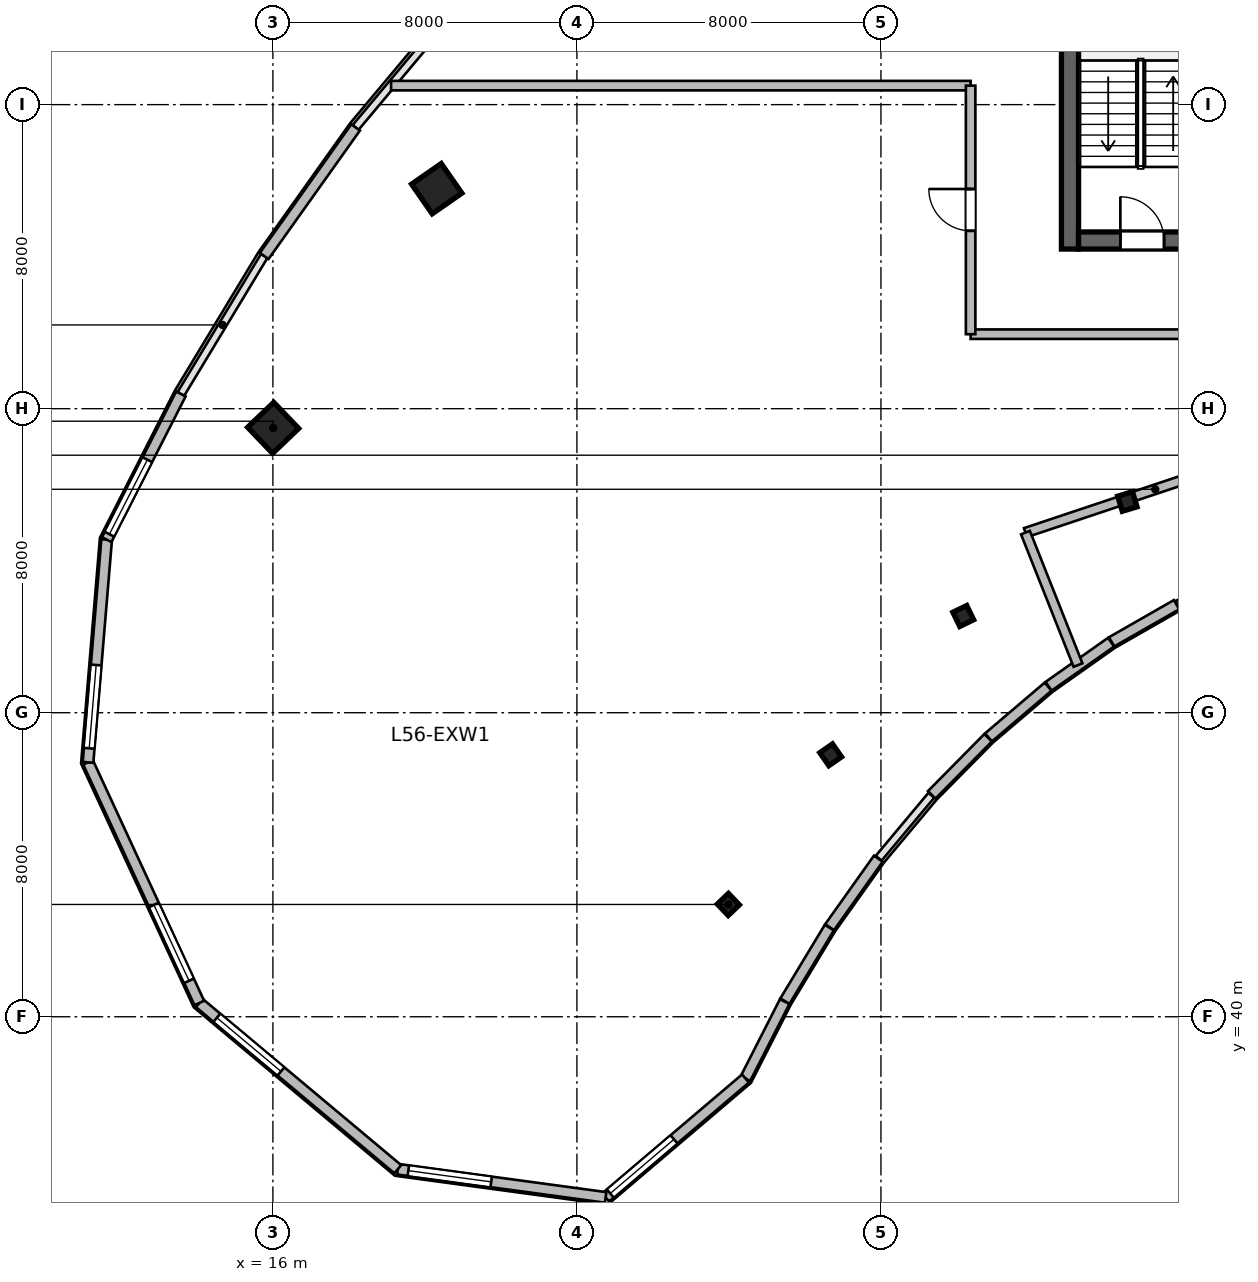
"""IFC4 building model, lengths in metres.
Left out: names, types, materials, properties, quantities, classifications, styles, units other than length and angle.
Written with IfcOpenShell. Run it as: python <this file> out.ifc"""

import sys

from ifc_helpers import new_model, si_unit, direction, frame, frame_2d, origin, origin_2d, place, context, subcontext, project, spatial, rectangle, i_section, extrude, source, transform, mapped, element, fill, save


model = new_model("IFC4")
c1 = context("Model", 3, precision=1e-05, world=origin(), true_north=direction((0.0, 1.0)))
c2 = subcontext(c1, "Body", "Model", "MODEL_VIEW")
j1 = project(units=[si_unit("LENGTHUNIT", "METRE"), si_unit("PLANEANGLEUNIT", "RADIAN")], contexts=[c1])
p1 = place(None, origin())
s1 = spatial("IfcSite", under=j1, at=p1, CompositionType="ELEMENT")
p2 = place(p1, origin())
s2 = spatial("IfcBuilding", under=s1, at=p2, CompositionType="ELEMENT")
p3 = place(p2, frame((0.0, 0.0, 231.3)))
s3 = spatial("IfcBuildingStorey", under=s2, at=p3, CompositionType="ELEMENT", Elevation=231.3)
m1 = source(origin(), c2, "Body", "SweptSolid", [
    extrude(rectangle(XDim=12.0, YDim=0.45, at=frame_2d((6.0, 0.0))), origin(), (0.0, 0.0, 1.0), 3.9),
])
p4 = place(p3, frame((36.975, 60.2, 0.0), z_axis=(0.0, 0.0, 1.0), x_axis=(0.0, 1.0, 0.0)))
e1 = element("IfcWall", 1, at=p4, inside=s3, PredefinedType="SHEAR", context=c2, shape_type="MappedRepresentation", body=[
    mapped(m1, transform((0.0, 0.0, 0.0), scale=1.0)),
])
m2 = source(origin(), c2, "Body", "SweptSolid", [
    extrude(rectangle(XDim=21.6, YDim=0.45, at=frame_2d((10.8, 0.0))), origin(), (0.0, 0.0, 1.0), 3.9),
])
p5 = place(p3, frame((37.2, 60.425, 0.0), z_axis=(0.0, 0.0, 1.0), x_axis=(1.0, 0.0, 0.0)))
e2 = element("IfcWall", 2, at=p5, inside=s3, PredefinedType="SHEAR", context=c2, shape_type="MappedRepresentation", body=[
    mapped(m2, transform((0.0, 0.0, 0.0), scale=1.0)),
])
p6 = place(p5, frame((1.1, 0.0, 0.0)))
e3 = element("IfcOpeningElement", 3, at=p6, cuts=e2, PredefinedType="OPENING", context=c2, shape_type="SweptSolid", body=[
    extrude(rectangle(XDim=1.15, YDim=2.15, at=frame_2d((0.575, 1.075))), frame((0.0, 0.235, 0.0), z_axis=(0.0, -1.0, 0.0), x_axis=(1.0, 0.0, 0.0)), (0.0, 0.0, 1.0), 0.47),
])
p7 = place(p5, frame((19.5, 0.0, 0.0)))
e4 = element("IfcOpeningElement", 4, at=p7, cuts=e2, PredefinedType="OPENING", context=c2, shape_type="SweptSolid", body=[
    extrude(rectangle(XDim=0.9, YDim=2.1, at=frame_2d((0.45, 1.05))), frame((0.0, 0.235, 0.0), z_axis=(0.0, -1.0, 0.0), x_axis=(1.0, 0.0, 0.0)), (0.0, 0.0, 1.0), 0.47),
])
p8 = place(p5, frame((12.02, 0.0, 0.0)))
e5 = element("IfcOpeningElement", 5, at=p8, cuts=e2, PredefinedType="OPENING", context=c2, shape_type="SweptSolid", body=[
    extrude(rectangle(XDim=1.6, YDim=2.15, at=frame_2d((0.8, 1.075))), frame((0.0, 0.235, 0.0), z_axis=(0.0, -1.0, 0.0), x_axis=(1.0, 0.0, 0.0)), (0.0, 0.0, 1.0), 0.47),
])
m3 = source(origin(), c2, "Body", "SweptSolid", [
    extrude(i_section(OverallWidth=0.406, OverallDepth=0.416, WebThickness=0.03, FlangeThickness=0.048, at=origin_2d()), origin(), (0.0, 0.0, 1.0), 3.9),
])
p9 = place(p3, frame((27.985, 42.955, 0.0), z_axis=(0.0, 0.0, 1.0), x_axis=(-0.690756218984, 0.723087716626, 0.0)))
e6 = element("IfcColumn", 6, at=p9, inside=s3, PredefinedType="COLUMN", context=c2, shape_type="MappedRepresentation", body=[
    mapped(m3, transform((0.0, 0.0, 0.0), scale=1.0)),
])
m4 = source(origin(), c2, "Body", "SweptSolid", [
    extrude(rectangle(XDim=0.95, YDim=0.95, at=origin_2d()), origin(), (0.0, 0.0, 1.0), 3.9),
])
p10 = place(p3, frame((16.007, 55.494, 0.0), z_axis=(0.0, 0.0, 1.0), x_axis=(-0.690756218984, 0.723087716626, 0.0)))
e7 = element("IfcColumn", 7, at=p10, inside=s3, PredefinedType="COLUMN", context=c2, shape_type="MappedRepresentation", body=[
    mapped(m4, transform((0.0, 0.0, 0.0), scale=1.0)),
])
p11 = place(p3, frame((30.677, 46.892, 0.0), z_axis=(0.0, 0.0, 1.0), x_axis=(-0.571143442153, 0.820850271661, 0.0)))
e8 = element("IfcColumn", 8, at=p11, inside=s3, PredefinedType="COLUMN", context=c2, shape_type="MappedRepresentation", body=[
    mapped(m3, transform((0.0, 0.0, 0.0), scale=1.0)),
])
p12 = place(p3, frame((20.311, 61.789, 0.0), z_axis=(0.0, 0.0, 1.0), x_axis=(-0.571143442153, 0.820850271661, 0.0)))
e9 = element("IfcColumn", 9, at=p12, inside=s3, PredefinedType="COLUMN", context=c2, shape_type="MappedRepresentation", body=[
    mapped(m4, transform((0.0, 0.0, 0.0), scale=1.0)),
])
for number, where, z_axis, x_axis in (
    (10, (34.166, 50.545, 0.0), (0.0, 0.0, 1.0), (-0.436, 0.9, 0.0)),
    (11, (38.485, 53.558, 0.0), (0.0, 0.0, 1.0), (-0.289, 0.957, 0.0)),
):
    element("IfcColumn", number, at=place(p3, frame(where, z_axis=z_axis, x_axis=x_axis)), inside=s3, PredefinedType="COLUMN", context=c2, shape_type="MappedRepresentation", body=[
        mapped(m3, transform((0.0, 0.0, 0.0), scale=1.0)),
    ])
m5 = source(origin(), c2, "Body", "SweptSolid", [
    extrude(rectangle(XDim=1.969, YDim=0.28, at=frame_2d((0.984, 0.0))), origin(), (0.0, 0.0, 1.0), 3.65),
])
p13 = place(p3, frame((39.779, 50.842, 0.0), z_axis=(0.0, 0.0, 1.0), x_axis=(-0.86797594681, -0.496606238139, 0.0)))
e12 = element("IfcWall", 12, at=p13, inside=s3, PredefinedType="SOLIDWALL", context=c2, shape_type="MappedRepresentation", body=[
    mapped(m5, transform((0.0, 0.0, 0.0), scale=1.0)),
])
m6 = source(origin(), c2, "Body", "SweptSolid", [
    extrude(rectangle(XDim=2.012, YDim=0.28, at=frame_2d((1.006, 0.0))), origin(), (0.0, 0.0, 1.0), 3.65),
])
p14 = place(p3, frame((38.055, 49.855, 0.0), z_axis=(0.0, 0.0, 1.0), x_axis=(-0.817008215805, -0.576626027255, 0.0)))
e13 = element("IfcWall", 13, at=p14, inside=s3, PredefinedType="SOLIDWALL", context=c2, shape_type="MappedRepresentation", body=[
    mapped(m6, transform((0.0, 0.0, 0.0), scale=1.0)),
])
m7 = source(origin(), c2, "Body", "SweptSolid", [
    extrude(rectangle(XDim=2.06, YDim=0.28, at=frame_2d((1.03, 0.0))), origin(), (0.0, 0.0, 1.0), 3.65),
])
p15 = place(p3, frame((36.399, 48.685, 0.0), z_axis=(0.0, 0.0, 1.0), x_axis=(-0.761494573969, -0.648171284319, 0.0)))
e14 = element("IfcWall", 14, at=p15, inside=s3, PredefinedType="SOLIDWALL", context=c2, shape_type="MappedRepresentation", body=[
    mapped(m7, transform((0.0, 0.0, 0.0), scale=1.0)),
])
m8 = source(origin(), c2, "Body", "SweptSolid", [
    extrude(rectangle(XDim=2.11, YDim=0.28, at=frame_2d((1.055, 0.0))), origin(), (0.0, 0.0, 1.0), 3.65),
])
p16 = place(p3, frame((34.819, 47.34, 0.0), z_axis=(0.0, 0.0, 1.0), x_axis=(-0.702695473125, -0.711490739258, 0.0)))
e15 = element("IfcWall", 15, at=p16, inside=s3, PredefinedType="SOLIDWALL", context=c2, shape_type="MappedRepresentation", body=[
    mapped(m8, transform((0.0, 0.0, 0.0), scale=1.0)),
])
m9 = source(origin(), c2, "Body", "SweptSolid", [
    extrude(rectangle(XDim=2.212, YDim=0.28, at=frame_2d((1.106, 0.0))), origin(), (0.0, 0.0, 1.0), 3.65),
])
p17 = place(p3, frame((31.931, 44.159, 0.0), z_axis=(0.0, 0.0, 1.0), x_axis=(-0.579639452819, -0.814873060504, 0.0)))
e16 = element("IfcWall", 16, at=p17, inside=s3, PredefinedType="SOLIDWALL", context=c2, shape_type="MappedRepresentation", body=[
    mapped(m9, transform((0.0, 0.0, 0.0), scale=1.0)),
])
m10 = source(origin(), c2, "Body", "SweptSolid", [
    extrude(rectangle(XDim=2.261, YDim=0.28, at=frame_2d((1.13, 0.0))), origin(), (0.0, 0.0, 1.0), 3.65),
])
p18 = place(p3, frame((30.642, 42.346, 0.0), z_axis=(0.0, 0.0, 1.0), x_axis=(-0.516891494538, -0.856050923062, 0.0)))
e17 = element("IfcWall", 17, at=p18, inside=s3, PredefinedType="SOLIDWALL", context=c2, shape_type="MappedRepresentation", body=[
    mapped(m10, transform((0.0, 0.0, 0.0), scale=1.0)),
])
m11 = source(origin(), c2, "Body", "SweptSolid", [
    extrude(rectangle(XDim=2.271, YDim=0.28, at=frame_2d((1.136, 0.0))), origin(), (0.0, 0.0, 1.0), 3.65),
])
p19 = place(p3, frame((29.467, 40.399, 0.0), z_axis=(0.0, 0.0, 1.0), x_axis=(-0.453993402883, -0.891005044957, 0.0)))
e18 = element("IfcWall", 18, at=p19, inside=s3, PredefinedType="SOLIDWALL", context=c2, shape_type="MappedRepresentation", body=[
    mapped(m11, transform((0.0, 0.0, 0.0), scale=1.0)),
])
m12 = source(origin(), c2, "Body", "SweptSolid", [
    extrude(rectangle(XDim=4.83, YDim=0.28, at=frame_2d((2.415, 0.0))), origin(), (0.0, 0.0, 1.0), 3.65),
])
p20 = place(p3, frame((28.436, 38.375, 0.0), z_axis=(0.0, 0.0, 1.0), x_axis=(-0.761890676316, -0.647705640968, 0.0)))
e19 = element("IfcWall", 19, at=p20, inside=s3, PredefinedType="SOLIDWALL", context=c2, shape_type="MappedRepresentation", body=[
    mapped(m12, transform((0.0, 0.0, 0.0), scale=1.0)),
])
p21 = place(p20, frame((2.47, 0.0, 0.95)))
e20 = element("IfcOpeningElement", 20, at=p21, cuts=e19, PredefinedType="OPENING", context=c2, shape_type="SweptSolid", body=[
    extrude(rectangle(XDim=2.2, YDim=2.1, at=frame_2d((1.1, 1.05))), frame((0.0, 0.15, 0.0), z_axis=(0.0, -1.0, 0.0), x_axis=(1.0, 0.0, 0.0)), (0.0, 0.0, 1.0), 0.3),
])
m13 = source(origin(), c2, "Body", "SweptSolid", [
    extrude(rectangle(XDim=5.52, YDim=0.28, at=frame_2d((2.76, 0.0))), origin(), (0.0, 0.0, 1.0), 3.65),
])
p22 = place(p3, frame((24.756, 35.247, 0.0), z_axis=(0.0, 0.0, 1.0), x_axis=(-0.99093029136, 0.134376923856, 0.0)))
e21 = element("IfcWall", 21, at=p22, inside=s3, PredefinedType="SOLIDWALL", context=c2, shape_type="MappedRepresentation", body=[
    mapped(m13, transform((0.0, 0.0, 0.0), scale=1.0)),
])
p23 = place(p22, frame((3.04, 0.0, 0.95)))
e22 = element("IfcOpeningElement", 22, at=p23, cuts=e21, PredefinedType="OPENING", context=c2, shape_type="SweptSolid", body=[
    extrude(rectangle(XDim=2.2, YDim=2.1, at=frame_2d((1.1, 1.05))), frame((0.0, 0.15, 0.0), z_axis=(0.0, -1.0, 0.0), x_axis=(1.0, 0.0, 0.0)), (0.0, 0.0, 1.0), 0.3),
])
m14 = source(origin(), c2, "Body", "SweptSolid", [
    extrude(rectangle(XDim=6.812, YDim=0.28, at=frame_2d((3.406, 0.0))), origin(), (0.0, 0.0, 1.0), 3.65),
])
p24 = place(p3, frame((19.286, 35.988, 0.0), z_axis=(0.0, 0.0, 1.0), x_axis=(-0.766712133953, 0.641991046394, 0.0)))
e23 = element("IfcWall", 23, at=p24, inside=s3, PredefinedType="SOLIDWALL", context=c2, shape_type="MappedRepresentation", body=[
    mapped(m14, transform((0.0, 0.0, 0.0), scale=1.0)),
])
p25 = place(p24, frame((4.009, 0.0, 0.95)))
e24 = element("IfcOpeningElement", 24, at=p25, cuts=e23, PredefinedType="OPENING", context=c2, shape_type="SweptSolid", body=[
    extrude(rectangle(XDim=2.2, YDim=2.1, at=frame_2d((1.1, 1.05))), frame((0.0, 0.15, 0.0), z_axis=(0.0, -1.0, 0.0), x_axis=(1.0, 0.0, 0.0)), (0.0, 0.0, 1.0), 0.3),
])
m15 = source(origin(), c2, "Body", "SweptSolid", [
    extrude(rectangle(XDim=6.977, YDim=0.28, at=frame_2d((3.488, 0.0))), origin(), (0.0, 0.0, 1.0), 3.65),
])
p26 = place(p3, frame((14.063, 40.362, 0.0), z_axis=(0.0, 0.0, 1.0), x_axis=(-0.41966832263, 0.907677530283, 0.0)))
e25 = element("IfcWall", 25, at=p26, inside=s3, PredefinedType="SOLIDWALL", context=c2, shape_type="MappedRepresentation", body=[
    mapped(m15, transform((0.0, 0.0, 0.0), scale=1.0)),
])
p27 = place(p26, frame((0.644, 0.0, 0.95)))
e26 = element("IfcOpeningElement", 26, at=p27, cuts=e25, PredefinedType="OPENING", context=c2, shape_type="SweptSolid", body=[
    extrude(rectangle(XDim=2.2, YDim=2.1, at=frame_2d((1.1, 1.05))), frame((0.0, 0.15, 0.0), z_axis=(0.0, -1.0, 0.0), x_axis=(1.0, 0.0, 0.0)), (0.0, 0.0, 1.0), 0.3),
])
m16 = source(origin(), c2, "Body", "SweptSolid", [
    extrude(rectangle(XDim=5.881, YDim=0.28, at=frame_2d((2.94, 0.0))), origin(), (0.0, 0.0, 1.0), 3.65),
])
p28 = place(p3, frame((11.135, 46.694, 0.0), z_axis=(0.0, 0.0, 1.0), x_axis=(0.083320333731, 0.996522815588, 0.0)))
e27 = element("IfcWall", 27, at=p28, inside=s3, PredefinedType="SOLIDWALL", context=c2, shape_type="MappedRepresentation", body=[
    mapped(m16, transform((0.0, 0.0, 0.0), scale=1.0)),
])
p29 = place(p28, frame((0.37, 0.0, 0.95)))
e28 = element("IfcOpeningElement", 28, at=p29, cuts=e27, PredefinedType="OPENING", context=c2, shape_type="SweptSolid", body=[
    extrude(rectangle(XDim=2.2, YDim=2.1, at=frame_2d((1.1, 1.05))), frame((0.0, 0.15, 0.0), z_axis=(0.0, -1.0, 0.0), x_axis=(1.0, 0.0, 0.0)), (0.0, 0.0, 1.0), 0.3),
])
m17 = source(origin(), c2, "Body", "SweptSolid", [
    extrude(rectangle(XDim=4.301, YDim=0.28, at=frame_2d((2.151, 0.0))), origin(), (0.0, 0.0, 1.0), 3.65),
])
p30 = place(p3, frame((11.625, 52.555, 0.0), z_axis=(0.0, 0.0, 1.0), x_axis=(0.454011655096, 0.89099574468, 0.0)))
e29 = element("IfcWall", 29, at=p30, inside=s3, PredefinedType="SOLIDWALL", context=c2, shape_type="MappedRepresentation", body=[
    mapped(m17, transform((0.0, 0.0, 0.0), scale=1.0)),
])
p31 = place(p30, frame((0.16, 0.0, 0.95)))
e30 = element("IfcOpeningElement", 30, at=p31, cuts=e29, PredefinedType="OPENING", context=c2, shape_type="SweptSolid", body=[
    extrude(rectangle(XDim=2.2, YDim=2.1, at=frame_2d((1.1, 1.05))), frame((0.0, 0.15, 0.0), z_axis=(0.0, -1.0, 0.0), x_axis=(1.0, 0.0, 0.0)), (0.0, 0.0, 1.0), 0.3),
])
m18 = source(origin(), c2, "Body", "SweptSolid", [
    extrude(rectangle(XDim=4.149, YDim=0.28, at=frame_2d((2.074, 0.0))), origin(), (0.0, 0.0, 1.0), 3.65),
])
p32 = place(p3, frame((15.771, 60.019, 0.0), z_axis=(0.0, 0.0, 1.0), x_axis=(0.579622789827, 0.814884913048, 0.0)))
e31 = element("IfcWall", 31, at=p32, inside=s3, PredefinedType="SOLIDWALL", context=c2, shape_type="MappedRepresentation", body=[
    mapped(m18, transform((0.0, 0.0, 0.0), scale=1.0)),
])
m19 = source(origin(), c2, "Body", "SweptSolid", [
    extrude(rectangle(XDim=12.86, YDim=0.25, at=frame_2d((6.43, 0.0))), origin(), (0.0, 0.0, 1.0), 3.095),
])
p33 = place(p3, frame((35.803, 52.738, 0.0), z_axis=(0.0, 0.0, 1.0), x_axis=(0.948466647997, 0.316876975554, 0.0)))
e32 = element("IfcWall", 32, at=p33, inside=s3, PredefinedType="PARTITIONING", context=c2, shape_type="MappedRepresentation", body=[
    mapped(m19, transform((0.0, 0.0, 0.0), scale=1.0)),
])
p34 = place(p33, frame((5.88, 0.0, 0.0)))
e33 = element("IfcOpeningElement", 33, at=p34, cuts=e32, PredefinedType="OPENING", context=c2, shape_type="SweptSolid", body=[
    extrude(rectangle(XDim=1.1, YDim=2.15, at=frame_2d((0.55, 1.075))), frame((0.0, 0.135, 0.0), z_axis=(0.0, -1.0, 0.0), x_axis=(1.0, 0.0, 0.0)), (0.0, 0.0, 1.0), 0.27),
])
m20 = source(origin(), c2, "Body", "SweptSolid", [
    extrude(rectangle(XDim=3.749, YDim=0.25, at=frame_2d((1.875, 0.0))), origin(), (0.0, 0.0, 1.0), 3.65),
])
p35 = place(p3, frame((37.186, 49.254, 0.0), z_axis=(0.0, 0.0, 1.0), x_axis=(-0.368851771682, 0.92948823044, 0.0)))
e34 = element("IfcWall", 34, at=p35, inside=s3, PredefinedType="PARTITIONING", context=c2, shape_type="MappedRepresentation", body=[
    mapped(m20, transform((0.0, 0.0, 0.0), scale=1.0)),
])
m21 = source(origin(), c2, "Body", "SweptSolid", [
    extrude(rectangle(XDim=12.39, YDim=0.25, at=frame_2d((6.195, 0.0))), origin(), (0.0, 0.0, 1.0), 3.217),
])
p36 = place(p3, frame((34.36, 57.96, 0.0), z_axis=(0.0, 0.0, 1.0), x_axis=(1.0, 0.0, 0.0)))
e35 = element("IfcWall", 35, at=p36, inside=s3, PredefinedType="PARTITIONING", context=c2, shape_type="MappedRepresentation", body=[
    mapped(m21, transform((0.0, 0.0, 0.0), scale=1.0)),
])
m22 = source(origin(), c2, "Body", "SweptSolid", [
    extrude(rectangle(XDim=15.25, YDim=0.25, at=frame_2d((7.625, 0.0))), origin(), (0.0, 0.0, 1.0), 3.65),
])
p37 = place(p3, frame((19.11, 64.5, 0.0), z_axis=(0.0, 0.0, 1.0), x_axis=(1.0, 0.0, 0.0)))
e36 = element("IfcWall", 36, at=p37, inside=s3, PredefinedType="PARTITIONING", context=c2, shape_type="MappedRepresentation", body=[
    mapped(m22, transform((0.0, 0.0, 0.0), scale=1.0)),
])
m23 = source(origin(), c2, "Body", "SweptSolid", [
    extrude(rectangle(XDim=6.54, YDim=0.25, at=frame_2d((3.27, 0.0))), origin(), (0.0, 0.0, 1.0), 3.65),
])
p38 = place(p3, frame((34.36, 57.96, 0.0), z_axis=(0.0, 0.0, 1.0), x_axis=(0.0, 1.0, 0.0)))
e37 = element("IfcWall", 37, at=p38, inside=s3, PredefinedType="PARTITIONING", context=c2, shape_type="MappedRepresentation", body=[
    mapped(m23, transform((0.0, 0.0, 0.0), scale=1.0)),
])
p39 = place(p38, frame((2.72, 0.0, 0.0)))
e38 = element("IfcOpeningElement", 38, at=p39, cuts=e37, PredefinedType="OPENING", context=c2, shape_type="SweptSolid", body=[
    extrude(rectangle(XDim=1.1, YDim=2.15, at=frame_2d((0.55, 1.075))), frame((0.0, 0.135, 0.0), z_axis=(0.0, -1.0, 0.0), x_axis=(1.0, 0.0, 0.0)), (0.0, 0.0, 1.0), 0.27),
])
m24 = source(origin(), c2, "Body", "SweptSolid", [
    extrude(rectangle(XDim=2.2, YDim=2.1, at=frame_2d((1.1, 1.05))), frame((0.0, 0.03, 0.0), z_axis=(0.0, -1.0, 0.0), x_axis=(1.0, 0.0, 0.0)), (0.0, 0.0, 1.0), 0.06),
])
p40 = place(p21, origin())
e39 = element("IfcWindow", 39, at=p40, inside=s3, PartitioningType="TRIPLE_PANEL_VERTICAL", PredefinedType="WINDOW", context=c2, shape_type="MappedRepresentation", body=[
    mapped(m24, transform((0.0, 0.0, 0.0), scale=1.0)),
])
fill(e20, e39)
p41 = place(p23, origin())
e40 = element("IfcWindow", 40, at=p41, inside=s3, PartitioningType="TRIPLE_PANEL_VERTICAL", PredefinedType="WINDOW", context=c2, shape_type="MappedRepresentation", body=[
    mapped(m24, transform((0.0, 0.0, 0.0), scale=1.0)),
])
fill(e22, e40)
p42 = place(p25, origin())
e41 = element("IfcWindow", 41, at=p42, inside=s3, PartitioningType="TRIPLE_PANEL_VERTICAL", PredefinedType="WINDOW", context=c2, shape_type="MappedRepresentation", body=[
    mapped(m24, transform((0.0, 0.0, 0.0), scale=1.0)),
])
fill(e24, e41)
p43 = place(p27, origin())
e42 = element("IfcWindow", 42, at=p43, inside=s3, PartitioningType="TRIPLE_PANEL_VERTICAL", PredefinedType="WINDOW", context=c2, shape_type="MappedRepresentation", body=[
    mapped(m24, transform((0.0, 0.0, 0.0), scale=1.0)),
])
fill(e26, e42)
p44 = place(p29, origin())
e43 = element("IfcWindow", 43, at=p44, inside=s3, PartitioningType="TRIPLE_PANEL_VERTICAL", PredefinedType="WINDOW", context=c2, shape_type="MappedRepresentation", body=[
    mapped(m24, transform((0.0, 0.0, 0.0), scale=1.0)),
])
fill(e28, e43)
p45 = place(p31, origin())
e44 = element("IfcWindow", 44, at=p45, inside=s3, PartitioningType="TRIPLE_PANEL_VERTICAL", PredefinedType="WINDOW", context=c2, shape_type="MappedRepresentation", body=[
    mapped(m24, transform((0.0, 0.0, 0.0), scale=1.0)),
])
fill(e30, e44)
m25 = source(origin(), c2, "Body", "SweptSolid", [
    extrude(rectangle(XDim=1.15, YDim=2.15, at=frame_2d((0.575, 1.075))), frame((0.0, 0.025, 0.0), z_axis=(0.0, -1.0, 0.0), x_axis=(1.0, 0.0, 0.0)), (0.0, 0.0, 1.0), 0.05),
])
p46 = place(p6, origin())
e45 = element("IfcDoor", 45, at=p46, inside=s3, OperationType="SINGLE_SWING_LEFT", PredefinedType="DOOR", context=c2, shape_type="MappedRepresentation", body=[
    mapped(m25, transform((0.0, 0.0, 0.0), scale=1.0)),
])
fill(e3, e45)
m26 = source(origin(), c2, "Body", "SweptSolid", [
    extrude(rectangle(XDim=1.1, YDim=2.15, at=frame_2d((0.55, 1.075))), frame((0.0, 0.025, 0.0), z_axis=(0.0, -1.0, 0.0), x_axis=(1.0, 0.0, 0.0)), (0.0, 0.0, 1.0), 0.05),
])
p47 = place(p39, origin())
e46 = element("IfcDoor", 46, at=p47, inside=s3, OperationType="SINGLE_SWING_RIGHT", PredefinedType="DOOR", context=c2, shape_type="MappedRepresentation", body=[
    mapped(m26, transform((0.0, 0.0, 0.0), scale=1.0)),
])
fill(e38, e46)
save(model, sys.argv[1])
